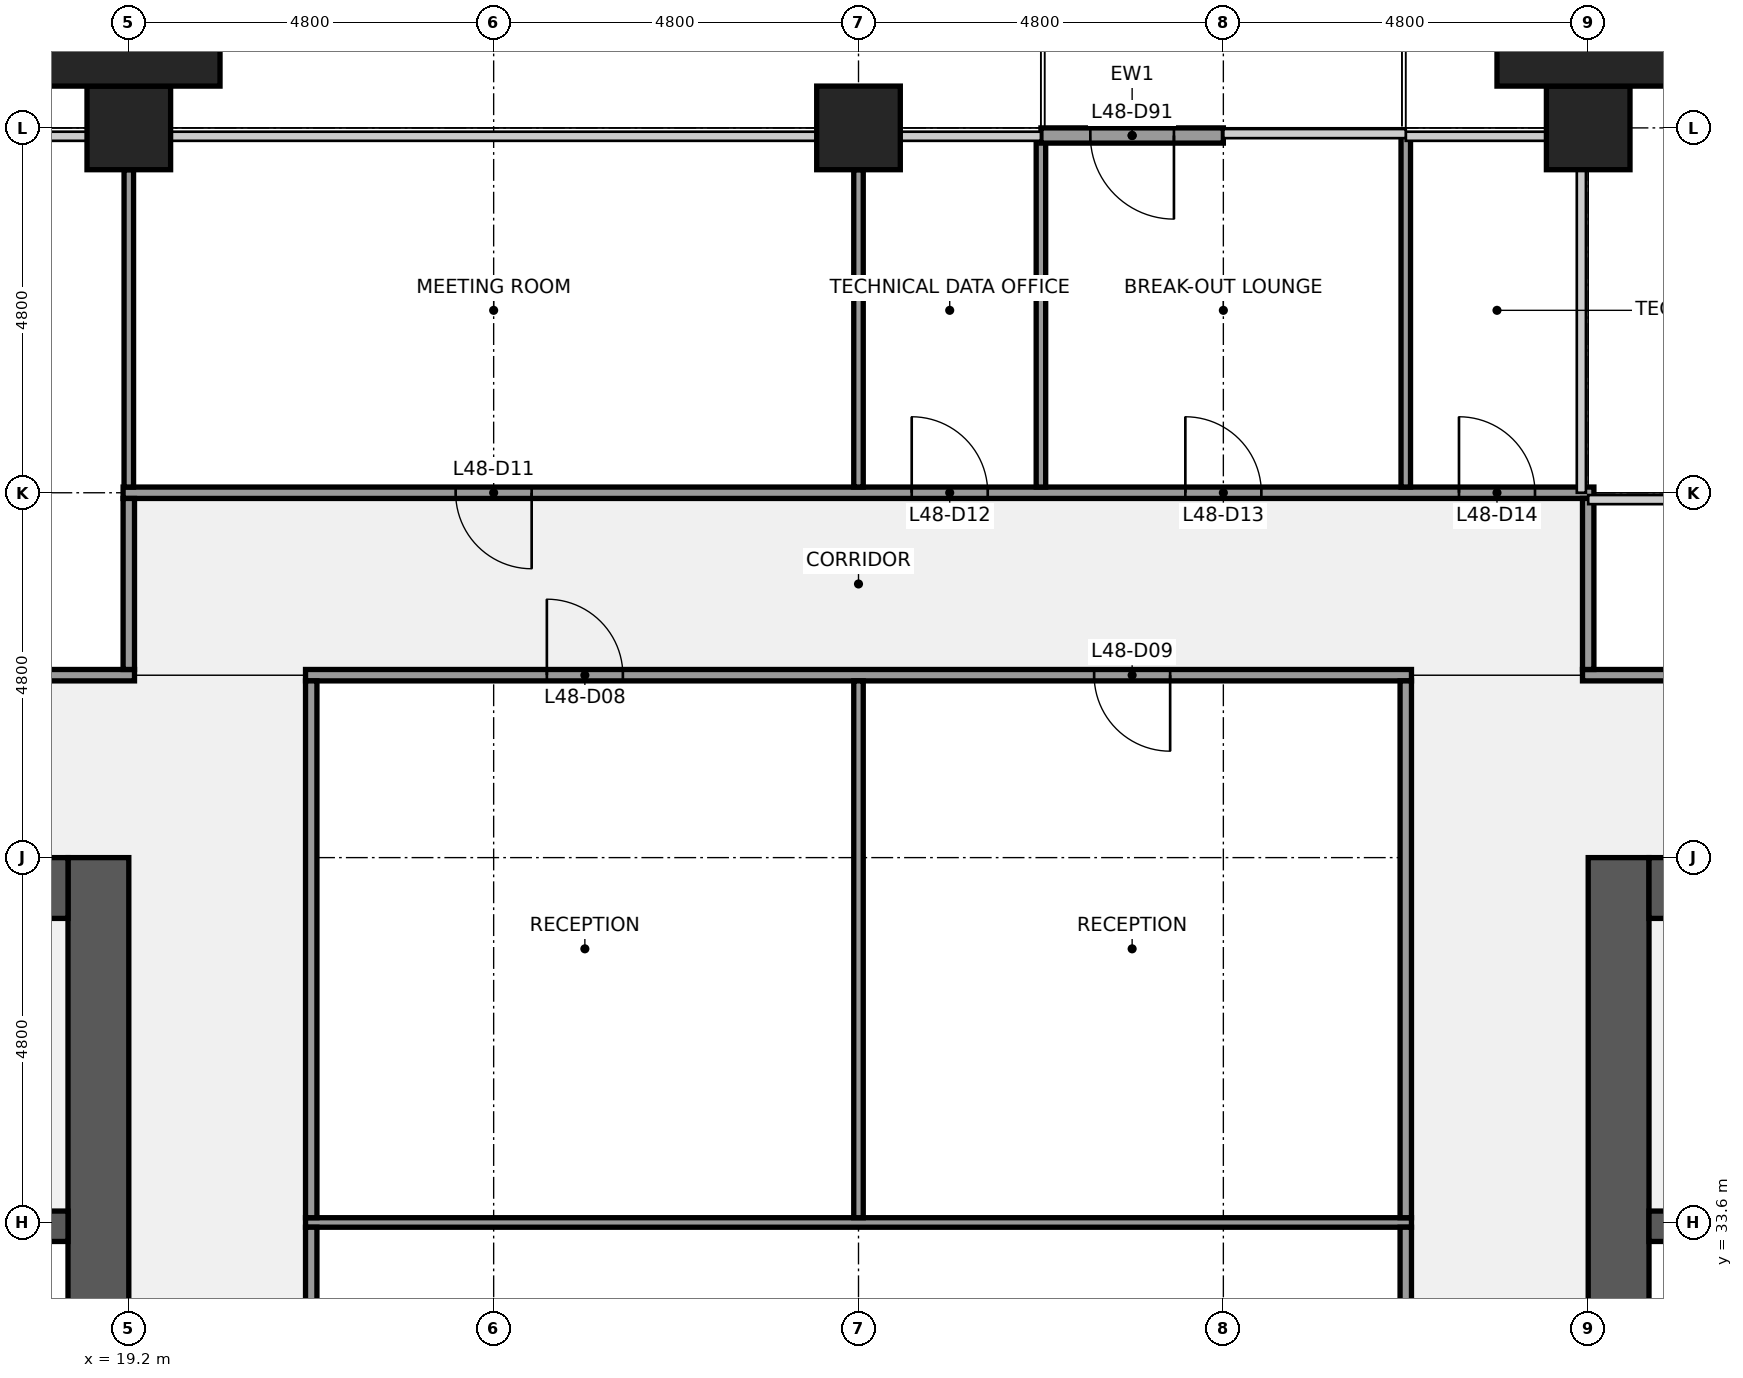
"""IFC4 building model, lengths in metres.
Left out: names, types, materials, properties, quantities, classifications, styles, units other than length and angle.
Written with IfcOpenShell. Run it as: python <this file> out.ifc"""

import sys

from ifc_helpers import new_model, si_unit, direction, frame, frame_2d, origin, origin_2d, place, context, subcontext, project, spatial, rectangle, extrude, element, fill, save


model = new_model("IFC4")
c1 = context("Model", 3, precision=1e-05, world=origin(), true_north=direction((0.0, 1.0)))
c2 = subcontext(c1, "Body", "Model", "MODEL_VIEW")
j1 = project(units=[si_unit("LENGTHUNIT", "METRE"), si_unit("PLANEANGLEUNIT", "RADIAN")], contexts=[c1])
p1 = place(None, origin())
s1 = spatial("IfcSite", under=j1, at=p1, CompositionType="ELEMENT")
p2 = place(p1, origin())
s2 = spatial("IfcBuilding", under=s1, at=p2, CompositionType="ELEMENT")
p3 = place(p2, frame((0.0, 0.0, 221.2)))
s3 = spatial("IfcBuildingStorey", under=s2, at=p3, CompositionType="ELEMENT", Elevation=221.2)
for number, where, z_axis, x_axis in (
    (1, (19.2, 48.0, 0.0), (0.0, 0.0, 1.0), (1.0, 0.0, 0.0)),
    (2, (28.8, 48.0, 0.0), (0.0, 0.0, 1.0), (1.0, 0.0, 0.0)),
    (3, (38.4, 48.0, 0.0), (0.0, 0.0, 1.0), (1.0, 0.0, 0.0)),
):
    element("IfcColumn", number, at=place(p3, frame(where, z_axis=z_axis, x_axis=x_axis)), inside=s3, PredefinedType="COLUMN", context=c2, shape_type="SweptSolid", body=[
        extrude(rectangle(XDim=1.1, YDim=1.1, at=origin_2d()), origin(), (0.0, 0.0, 1.0), 4.0),
    ])
p4 = place(p3, frame((18.8, 38.4, 0.0), z_axis=(0.0, 0.0, 1.0), x_axis=(0.0, -1.0, 0.0)))
e4 = element("IfcWall", 4, at=p4, inside=s3, PredefinedType="SHEAR", context=c2, shape_type="SweptSolid", body=[
    extrude(rectangle(XDim=28.8, YDim=0.8, at=frame_2d((14.4, 0.0))), origin(), (0.0, 0.0, 1.0), 3.84),
])
p5 = place(p4, frame((18.3, 0.0, 0.0)))
e5 = element("IfcOpeningElement", 5, at=p5, cuts=e4, PredefinedType="OPENING", context=c2, shape_type="SweptSolid", body=[
    extrude(rectangle(XDim=1.8, YDim=2.1, at=frame_2d((0.9, 1.05))), frame((0.0, 0.41, 0.0), z_axis=(0.0, -1.0, 0.0), x_axis=(1.0, 0.0, 0.0)), (0.0, 0.0, 1.0), 0.82),
])
p6 = place(p4, frame((8.7, 0.0, 0.0)))
e6 = element("IfcOpeningElement", 6, at=p6, cuts=e4, PredefinedType="OPENING", context=c2, shape_type="SweptSolid", body=[
    extrude(rectangle(XDim=1.8, YDim=2.1, at=frame_2d((0.9, 1.05))), frame((0.0, 0.41, 0.0), z_axis=(0.0, -1.0, 0.0), x_axis=(1.0, 0.0, 0.0)), (0.0, 0.0, 1.0), 0.82),
])
p7 = place(p3, frame((0.8, 33.55, 0.0), z_axis=(0.0, 0.0, 1.0), x_axis=(1.0, 0.0, 0.0)))
e7 = element("IfcWall", 7, at=p7, inside=s3, PredefinedType="SHEAR", context=c2, shape_type="SweptSolid", body=[
    extrude(rectangle(XDim=17.6, YDim=0.4, at=frame_2d((8.8, 0.0))), origin(), (0.0, 0.0, 1.0), 3.84),
])
p8 = place(p3, frame((9.6, 38.0, 0.0), z_axis=(0.0, 0.0, 1.0), x_axis=(1.0, 0.0, 0.0)))
e8 = element("IfcWall", 8, at=p8, inside=s3, PredefinedType="SHEAR", context=c2, shape_type="SweptSolid", body=[
    extrude(rectangle(XDim=8.8, YDim=0.8, at=frame_2d((4.4, 0.0))), origin(), (0.0, 0.0, 1.0), 3.84),
])
p9 = place(p8, frame((6.65, 0.0, 0.0)))
e9 = element("IfcOpeningElement", 9, at=p9, cuts=e8, PredefinedType="OPENING", context=c2, shape_type="SweptSolid", body=[
    extrude(rectangle(XDim=1.1, YDim=2.1, at=frame_2d((0.55, 1.05))), frame((0.0, 0.41, 0.0), z_axis=(0.0, -1.0, 0.0), x_axis=(1.0, 0.0, 0.0)), (0.0, 0.0, 1.0), 0.82),
])
p10 = place(p3, frame((38.8, 9.6, 0.0), z_axis=(0.0, 0.0, 1.0), x_axis=(0.0, 1.0, 0.0)))
e10 = element("IfcWall", 10, at=p10, inside=s3, PredefinedType="SHEAR", context=c2, shape_type="SweptSolid", body=[
    extrude(rectangle(XDim=28.8, YDim=0.8, at=frame_2d((14.4, 0.0))), origin(), (0.0, 0.0, 1.0), 3.84),
])
p11 = place(p10, frame((8.7, 0.0, 0.0)))
e11 = element("IfcOpeningElement", 11, at=p11, cuts=e10, PredefinedType="OPENING", context=c2, shape_type="SweptSolid", body=[
    extrude(rectangle(XDim=1.8, YDim=2.1, at=frame_2d((0.9, 1.05))), frame((0.0, 0.41, 0.0), z_axis=(0.0, -1.0, 0.0), x_axis=(1.0, 0.0, 0.0)), (0.0, 0.0, 1.0), 0.82),
])
p12 = place(p10, frame((18.3, 0.0, 0.0)))
e12 = element("IfcOpeningElement", 12, at=p12, cuts=e10, PredefinedType="OPENING", context=c2, shape_type="SweptSolid", body=[
    extrude(rectangle(XDim=1.8, YDim=2.1, at=frame_2d((0.9, 1.05))), frame((0.0, 0.41, 0.0), z_axis=(0.0, -1.0, 0.0), x_axis=(1.0, 0.0, 0.0)), (0.0, 0.0, 1.0), 0.82),
])
p13 = place(p3, frame((39.2, 33.55, 0.0), z_axis=(0.0, 0.0, 1.0), x_axis=(1.0, 0.0, 0.0)))
e13 = element("IfcWall", 13, at=p13, inside=s3, PredefinedType="SHEAR", context=c2, shape_type="SweptSolid", body=[
    extrude(rectangle(XDim=17.6, YDim=0.4, at=frame_2d((8.8, 0.0))), origin(), (0.0, 0.0, 1.0), 3.84),
])
p14 = place(p3, frame((39.2, 38.0, 0.0), z_axis=(0.0, 0.0, 1.0), x_axis=(1.0, 0.0, 0.0)))
e14 = element("IfcWall", 14, at=p14, inside=s3, PredefinedType="SHEAR", context=c2, shape_type="SweptSolid", body=[
    extrude(rectangle(XDim=8.8, YDim=0.8, at=frame_2d((4.4, 0.0))), origin(), (0.0, 0.0, 1.0), 3.84),
])
p15 = place(p14, frame((1.05, 0.0, 0.0)))
e15 = element("IfcOpeningElement", 15, at=p15, cuts=e14, PredefinedType="OPENING", context=c2, shape_type="SweptSolid", body=[
    extrude(rectangle(XDim=1.1, YDim=2.1, at=frame_2d((0.55, 1.05))), frame((0.0, 0.41, 0.0), z_axis=(0.0, -1.0, 0.0), x_axis=(1.0, 0.0, 0.0)), (0.0, 0.0, 1.0), 0.82),
])
p16 = place(p3, frame((21.525, 33.6, 0.0), z_axis=(0.0, 0.0, 1.0), x_axis=(1.0, 0.0, 0.0)))
e16 = element("IfcWall", 16, at=p16, inside=s3, PredefinedType="PARTITIONING", context=c2, shape_type="SweptSolid", body=[
    extrude(rectangle(XDim=14.55, YDim=0.125, at=frame_2d((7.275, 0.0))), origin(), (0.0, 0.0, 1.0), 2.87),
])
p17 = place(p3, frame((9.7, 40.8, 0.0), z_axis=(0.0, 0.0, 1.0), x_axis=(1.0, 0.0, 0.0)))
e17 = element("IfcWall", 17, at=p17, inside=s3, PredefinedType="PARTITIONING", context=c2, shape_type="SweptSolid", body=[
    extrude(rectangle(XDim=9.575, YDim=0.15, at=frame_2d((4.788, 0.0))), origin(), (0.0, 0.0, 1.0), 2.87),
])
p18 = place(p17, frame((4.25, 0.0, 0.0)))
e18 = element("IfcOpeningElement", 18, at=p18, cuts=e17, PredefinedType="OPENING", context=c2, shape_type="SweptSolid", body=[
    extrude(rectangle(XDim=1.0, YDim=2.1, at=frame_2d((0.5, 1.05))), frame((0.0, 0.085, 0.0), z_axis=(0.0, -1.0, 0.0), x_axis=(1.0, 0.0, 0.0)), (0.0, 0.0, 1.0), 0.17),
])
p19 = place(p3, frame((21.525, 40.8, 0.0), z_axis=(0.0, 0.0, 1.0), x_axis=(1.0, 0.0, 0.0)))
e19 = element("IfcWall", 19, at=p19, inside=s3, PredefinedType="PARTITIONING", context=c2, shape_type="SweptSolid", body=[
    extrude(rectangle(XDim=14.55, YDim=0.15, at=frame_2d((7.275, 0.0))), origin(), (0.0, 0.0, 1.0), 2.87),
])
p20 = place(p19, frame((3.175, 0.0, 0.0)))
e20 = element("IfcOpeningElement", 20, at=p20, cuts=e19, PredefinedType="OPENING", context=c2, shape_type="SweptSolid", body=[
    extrude(rectangle(XDim=1.0, YDim=2.1, at=frame_2d((0.5, 1.05))), frame((0.0, 0.085, 0.0), z_axis=(0.0, -1.0, 0.0), x_axis=(1.0, 0.0, 0.0)), (0.0, 0.0, 1.0), 0.17),
])
p21 = place(p19, frame((10.375, 0.0, 0.0)))
e21 = element("IfcOpeningElement", 21, at=p21, cuts=e19, PredefinedType="OPENING", context=c2, shape_type="SweptSolid", body=[
    extrude(rectangle(XDim=1.0, YDim=2.1, at=frame_2d((0.5, 1.05))), frame((0.0, 0.085, 0.0), z_axis=(0.0, -1.0, 0.0), x_axis=(1.0, 0.0, 0.0)), (0.0, 0.0, 1.0), 0.17),
])
p22 = place(p3, frame((38.325, 40.8, 0.0), z_axis=(0.0, 0.0, 1.0), x_axis=(1.0, 0.0, 0.0)))
e22 = element("IfcWall", 22, at=p22, inside=s3, PredefinedType="PARTITIONING", context=c2, shape_type="SweptSolid", body=[
    extrude(rectangle(XDim=9.575, YDim=0.15, at=frame_2d((4.788, 0.0))), origin(), (0.0, 0.0, 1.0), 2.87),
])
p23 = place(p22, frame((4.325, 0.0, 0.0)))
e23 = element("IfcOpeningElement", 23, at=p23, cuts=e22, PredefinedType="OPENING", context=c2, shape_type="SweptSolid", body=[
    extrude(rectangle(XDim=1.0, YDim=2.1, at=frame_2d((0.5, 1.05))), frame((0.0, 0.085, 0.0), z_axis=(0.0, -1.0, 0.0), x_axis=(1.0, 0.0, 0.0)), (0.0, 0.0, 1.0), 0.17),
])
p24 = place(p3, frame((19.125, 43.2, 0.0), z_axis=(0.0, 0.0, 1.0), x_axis=(1.0, 0.0, 0.0)))
e24 = element("IfcWall", 24, at=p24, inside=s3, PredefinedType="PARTITIONING", context=c2, shape_type="SweptSolid", body=[
    extrude(rectangle(XDim=19.35, YDim=0.15, at=frame_2d((9.675, 0.0))), origin(), (0.0, 0.0, 1.0), 2.87),
])
p25 = place(p24, frame((4.375, 0.0, 0.0)))
e25 = element("IfcOpeningElement", 25, at=p25, cuts=e24, PredefinedType="OPENING", context=c2, shape_type="SweptSolid", body=[
    extrude(rectangle(XDim=1.0, YDim=2.1, at=frame_2d((0.5, 1.05))), frame((0.0, 0.085, 0.0), z_axis=(0.0, -1.0, 0.0), x_axis=(1.0, 0.0, 0.0)), (0.0, 0.0, 1.0), 0.17),
])
p26 = place(p24, frame((10.375, 0.0, 0.0)))
e26 = element("IfcOpeningElement", 26, at=p26, cuts=e24, PredefinedType="OPENING", context=c2, shape_type="SweptSolid", body=[
    extrude(rectangle(XDim=1.0, YDim=2.1, at=frame_2d((0.5, 1.05))), frame((0.0, 0.085, 0.0), z_axis=(0.0, -1.0, 0.0), x_axis=(1.0, 0.0, 0.0)), (0.0, 0.0, 1.0), 0.17),
])
p27 = place(p24, frame((13.975, 0.0, 0.0)))
e27 = element("IfcOpeningElement", 27, at=p27, cuts=e24, PredefinedType="OPENING", context=c2, shape_type="SweptSolid", body=[
    extrude(rectangle(XDim=1.0, YDim=2.1, at=frame_2d((0.5, 1.05))), frame((0.0, 0.085, 0.0), z_axis=(0.0, -1.0, 0.0), x_axis=(1.0, 0.0, 0.0)), (0.0, 0.0, 1.0), 0.17),
])
p28 = place(p24, frame((17.575, 0.0, 0.0)))
e28 = element("IfcOpeningElement", 28, at=p28, cuts=e24, PredefinedType="OPENING", context=c2, shape_type="SweptSolid", body=[
    extrude(rectangle(XDim=1.0, YDim=2.1, at=frame_2d((0.5, 1.05))), frame((0.0, 0.085, 0.0), z_axis=(0.0, -1.0, 0.0), x_axis=(1.0, 0.0, 0.0)), (0.0, 0.0, 1.0), 0.17),
])
p29 = place(p3, frame((19.2, 43.275, 0.0), z_axis=(0.0, 0.0, 1.0), x_axis=(0.0, 1.0, 0.0)))
e29 = element("IfcWall", 29, at=p29, inside=s3, PredefinedType="PARTITIONING", context=c2, shape_type="SweptSolid", body=[
    extrude(rectangle(XDim=4.175, YDim=0.125, at=frame_2d((2.087, 0.0))), origin(), (0.0, 0.0, 1.0), 2.87),
])
p30 = place(p3, frame((19.2, 40.875, 0.0), z_axis=(0.0, 0.0, 1.0), x_axis=(0.0, 1.0, 0.0)))
e30 = element("IfcWall", 30, at=p30, inside=s3, PredefinedType="PARTITIONING", context=c2, shape_type="SweptSolid", body=[
    extrude(rectangle(XDim=2.25, YDim=0.15, at=frame_2d((1.125, 0.0))), origin(), (0.0, 0.0, 1.0), 2.87),
])
p31 = place(p3, frame((21.6, 24.062, 0.0), z_axis=(0.0, 0.0, 1.0), x_axis=(0.0, 1.0, 0.0)))
e31 = element("IfcWall", 31, at=p31, inside=s3, PredefinedType="PARTITIONING", context=c2, shape_type="SweptSolid", body=[
    extrude(rectangle(XDim=9.475, YDim=0.15, at=frame_2d((4.738, 0.0))), origin(), (0.0, 0.0, 1.0), 2.87),
])
p32 = place(p31, frame((4.238, 0.0, 0.0)))
e32 = element("IfcOpeningElement", 32, at=p32, cuts=e31, PredefinedType="OPENING", context=c2, shape_type="SweptSolid", body=[
    extrude(rectangle(XDim=1.0, YDim=2.1, at=frame_2d((0.5, 1.05))), frame((0.0, 0.085, 0.0), z_axis=(0.0, -1.0, 0.0), x_axis=(1.0, 0.0, 0.0)), (0.0, 0.0, 1.0), 0.17),
])
p33 = place(p3, frame((21.6, 33.663, 0.0), z_axis=(0.0, 0.0, 1.0), x_axis=(0.0, 1.0, 0.0)))
e33 = element("IfcWall", 33, at=p33, inside=s3, PredefinedType="PARTITIONING", context=c2, shape_type="SweptSolid", body=[
    extrude(rectangle(XDim=7.062, YDim=0.15, at=frame_2d((3.531, 0.0))), origin(), (0.0, 0.0, 1.0), 2.87),
])
p34 = place(p3, frame((28.8, 33.663, 0.0), z_axis=(0.0, 0.0, 1.0), x_axis=(0.0, 1.0, 0.0)))
e34 = element("IfcWall", 34, at=p34, inside=s3, PredefinedType="PARTITIONING", context=c2, shape_type="SweptSolid", body=[
    extrude(rectangle(XDim=7.062, YDim=0.125, at=frame_2d((3.531, 0.0))), origin(), (0.0, 0.0, 1.0), 2.87),
])
p35 = place(p3, frame((28.8, 43.275, 0.0), z_axis=(0.0, 0.0, 1.0), x_axis=(0.0, 1.0, 0.0)))
e35 = element("IfcWall", 35, at=p35, inside=s3, PredefinedType="PARTITIONING", context=c2, shape_type="SweptSolid", body=[
    extrude(rectangle(XDim=4.175, YDim=0.125, at=frame_2d((2.087, 0.0))), origin(), (0.0, 0.0, 1.0), 2.87),
])
for number, where, z_axis, x_axis in (
    (36, (31.2, 43.275, 0.0), (0.0, 0.0, 1.0), (0.0, 1.0, 0.0)),
    (37, (36.0, 43.275, 0.0), (0.0, 0.0, 1.0), (0.0, 1.0, 0.0)),
):
    element("IfcWall", number, at=place(p3, frame(where, z_axis=z_axis, x_axis=x_axis)), inside=s3, PredefinedType="PARTITIONING", context=c2, shape_type="SweptSolid", body=[
        extrude(rectangle(XDim=4.625, YDim=0.125, at=frame_2d((2.312, 0.0))), origin(), (0.0, 0.0, 1.0), 2.87),
    ])
p36 = place(p3, frame((36.0, 24.062, 0.0), z_axis=(0.0, 0.0, 1.0), x_axis=(0.0, 1.0, 0.0)))
e38 = element("IfcWall", 38, at=p36, inside=s3, PredefinedType="PARTITIONING", context=c2, shape_type="SweptSolid", body=[
    extrude(rectangle(XDim=9.475, YDim=0.15, at=frame_2d((4.738, 0.0))), origin(), (0.0, 0.0, 1.0), 2.87),
])
p37 = place(p3, frame((36.0, 33.663, 0.0), z_axis=(0.0, 0.0, 1.0), x_axis=(0.0, 1.0, 0.0)))
e39 = element("IfcWall", 39, at=p37, inside=s3, PredefinedType="PARTITIONING", context=c2, shape_type="SweptSolid", body=[
    extrude(rectangle(XDim=7.062, YDim=0.15, at=frame_2d((3.531, 0.0))), origin(), (0.0, 0.0, 1.0), 2.87),
])
p38 = place(p3, frame((38.4, 40.875, 0.0), z_axis=(0.0, 0.0, 1.0), x_axis=(0.0, 1.0, 0.0)))
e40 = element("IfcWall", 40, at=p38, inside=s3, PredefinedType="PARTITIONING", context=c2, shape_type="SweptSolid", body=[
    extrude(rectangle(XDim=2.25, YDim=0.15, at=frame_2d((1.125, 0.0))), origin(), (0.0, 0.0, 1.0), 2.87),
])
p39 = place(p3, frame((33.6, 47.9, 0.0), z_axis=(0.0, 0.0, 1.0), x_axis=(-1.0, 0.0, 0.0)))
e41 = element("IfcWall", 41, at=p39, inside=s3, PredefinedType="SOLIDWALL", context=c2, shape_type="SweptSolid", body=[
    extrude(rectangle(XDim=2.4, YDim=0.2, at=frame_2d((1.2, 0.0))), origin(), (0.0, 0.0, 1.0), 3.314),
])
p40 = place(p39, frame((0.65, 0.0, 0.0)))
e42 = element("IfcOpeningElement", 42, at=p40, cuts=e41, PredefinedType="OPENING", context=c2, shape_type="SweptSolid", body=[
    extrude(rectangle(XDim=1.1, YDim=2.1, at=frame_2d((0.55, 1.05))), frame((0.0, 0.11, 0.0), z_axis=(0.0, -1.0, 0.0), x_axis=(1.0, 0.0, 0.0)), (0.0, 0.0, 1.0), 0.22),
])
for number, where, z_axis, x_axis in (
    (43, (19.2, 49.025, 0.0), (0.0, 0.0, 1.0), (1.0, 0.0, 0.0)),
    (44, (38.4, 49.025, 0.0), (0.0, 0.0, 1.0), (1.0, 0.0, 0.0)),
):
    element("IfcColumn", number, at=place(p3, frame(where, z_axis=z_axis, x_axis=x_axis)), inside=s3, PredefinedType="PILASTER", context=c2, shape_type="SweptSolid", body=[
        extrude(rectangle(XDim=2.4, YDim=0.95, at=origin_2d()), origin(), (0.0, 0.0, 1.0), 4.0),
    ])
p41 = place(p20, origin())
e45 = element("IfcDoor", 45, at=p41, inside=s3, OperationType="SINGLE_SWING_LEFT", PredefinedType="DOOR", context=c2, shape_type="SweptSolid", body=[
    extrude(rectangle(XDim=1.0, YDim=2.1, at=frame_2d((0.5, 1.05))), frame((0.0, 0.025, 0.0), z_axis=(0.0, -1.0, 0.0), x_axis=(1.0, 0.0, 0.0)), (0.0, 0.0, 1.0), 0.05),
])
fill(e20, e45)
p42 = place(p21, origin())
e46 = element("IfcDoor", 46, at=p42, inside=s3, OperationType="SINGLE_SWING_RIGHT", PredefinedType="DOOR", context=c2, shape_type="SweptSolid", body=[
    extrude(rectangle(XDim=1.0, YDim=2.1, at=frame_2d((0.5, 1.05))), frame((0.0, 0.025, 0.0), z_axis=(0.0, -1.0, 0.0), x_axis=(1.0, 0.0, 0.0)), (0.0, 0.0, 1.0), 0.05),
])
fill(e21, e46)
p43 = place(p25, origin())
e47 = element("IfcDoor", 47, at=p43, inside=s3, OperationType="SINGLE_SWING_RIGHT", PredefinedType="DOOR", context=c2, shape_type="SweptSolid", body=[
    extrude(rectangle(XDim=1.0, YDim=2.1, at=frame_2d((0.5, 1.05))), frame((0.0, 0.025, 0.0), z_axis=(0.0, -1.0, 0.0), x_axis=(1.0, 0.0, 0.0)), (0.0, 0.0, 1.0), 0.05),
])
fill(e25, e47)
p44 = place(p26, origin())
e48 = element("IfcDoor", 48, at=p44, inside=s3, OperationType="SINGLE_SWING_LEFT", PredefinedType="DOOR", context=c2, shape_type="SweptSolid", body=[
    extrude(rectangle(XDim=1.0, YDim=2.1, at=frame_2d((0.5, 1.05))), frame((0.0, 0.025, 0.0), z_axis=(0.0, -1.0, 0.0), x_axis=(1.0, 0.0, 0.0)), (0.0, 0.0, 1.0), 0.05),
])
fill(e26, e48)
p45 = place(p27, origin())
e49 = element("IfcDoor", 49, at=p45, inside=s3, OperationType="SINGLE_SWING_LEFT", PredefinedType="DOOR", context=c2, shape_type="SweptSolid", body=[
    extrude(rectangle(XDim=1.0, YDim=2.1, at=frame_2d((0.5, 1.05))), frame((0.0, 0.025, 0.0), z_axis=(0.0, -1.0, 0.0), x_axis=(1.0, 0.0, 0.0)), (0.0, 0.0, 1.0), 0.05),
])
fill(e27, e49)
p46 = place(p28, origin())
e50 = element("IfcDoor", 50, at=p46, inside=s3, OperationType="SINGLE_SWING_LEFT", PredefinedType="DOOR", context=c2, shape_type="SweptSolid", body=[
    extrude(rectangle(XDim=1.0, YDim=2.1, at=frame_2d((0.5, 1.05))), frame((0.0, 0.025, 0.0), z_axis=(0.0, -1.0, 0.0), x_axis=(1.0, 0.0, 0.0)), (0.0, 0.0, 1.0), 0.05),
])
fill(e28, e50)
p47 = place(p40, origin())
e51 = element("IfcDoor", 51, at=p47, inside=s3, OperationType="SINGLE_SWING_LEFT", PredefinedType="DOOR", context=c2, shape_type="SweptSolid", body=[
    extrude(rectangle(XDim=1.1, YDim=2.1, at=frame_2d((0.55, 1.05))), frame((0.0, 0.025, 0.0), z_axis=(0.0, -1.0, 0.0), x_axis=(1.0, 0.0, 0.0)), (0.0, 0.0, 1.0), 0.05),
])
fill(e42, e51)
save(model, sys.argv[1])
